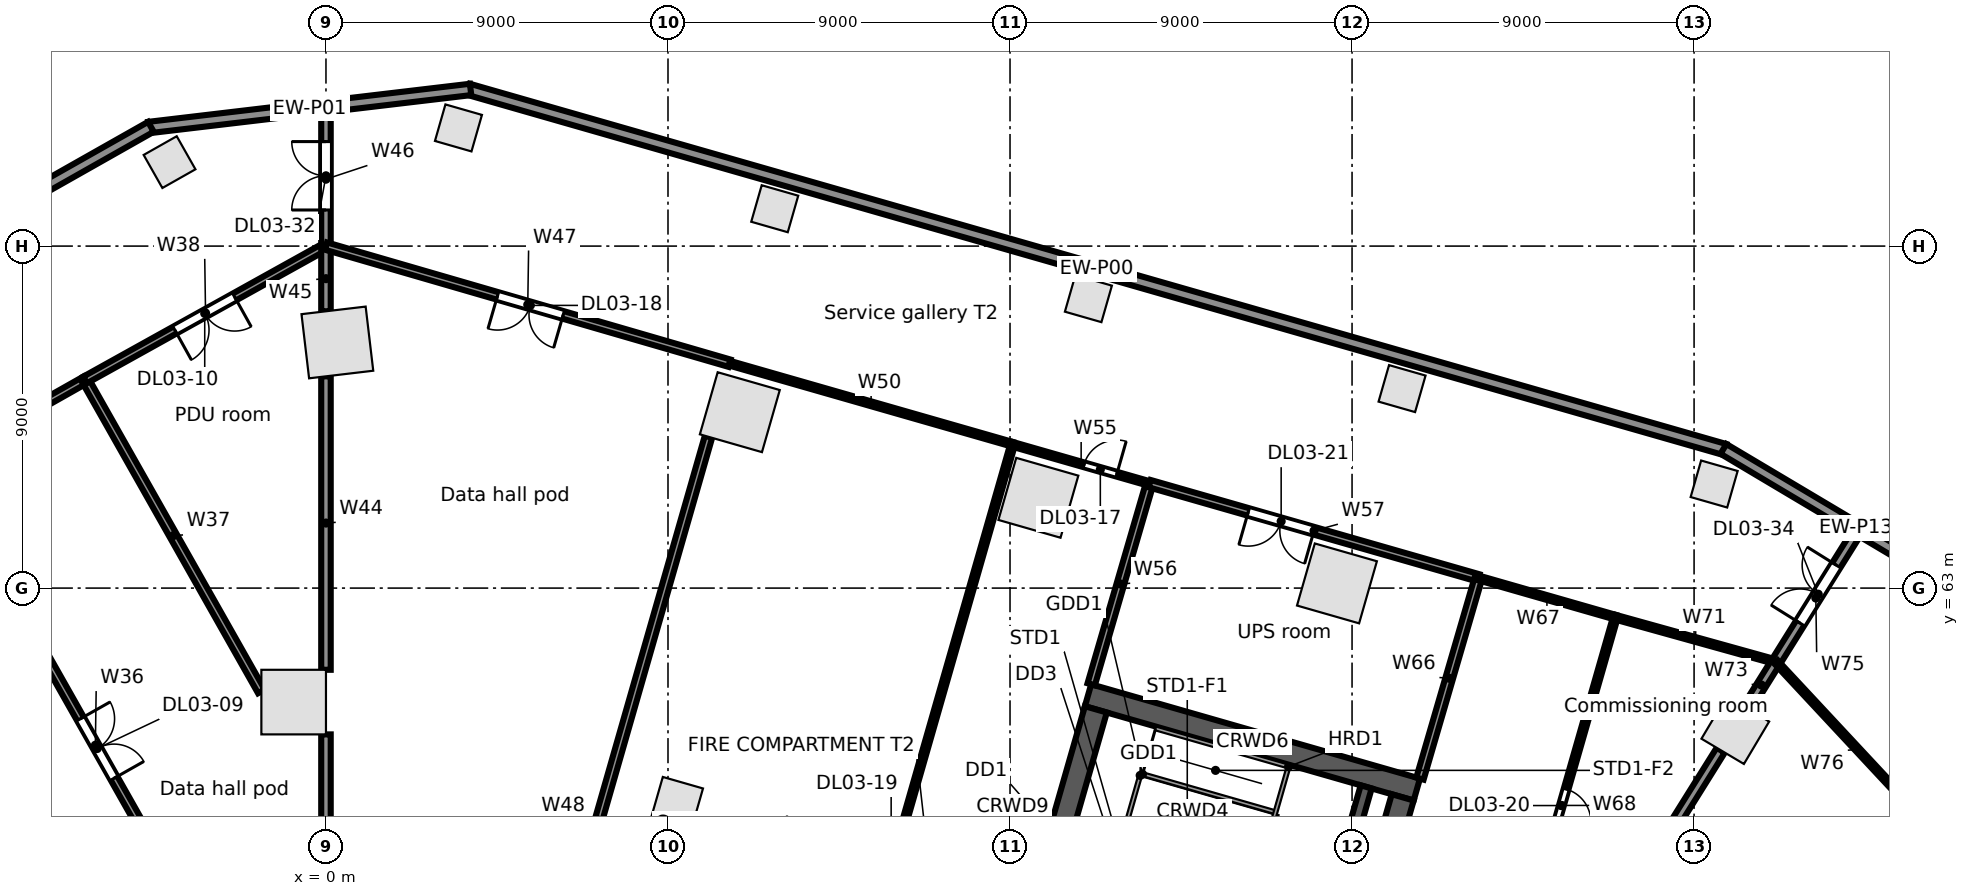
"""IFC4 building model, lengths in metres.
Left out: names, types, materials, properties, quantities, classifications, styles, units other than length and angle.
Written with IfcOpenShell. Run it as: python <this file> out.ifc"""

import sys

from ifc_helpers import new_model, si_unit, direction, frame, frame_2d, origin, origin_2d, place, context, subcontext, project, spatial, rectangle, extrude, element, fill, save


model = new_model("IFC4")
c1 = context("Model", 3, precision=1e-05, world=origin(), true_north=direction((0.0, 1.0)))
c2 = subcontext(c1, "Body", "Model", "MODEL_VIEW")
j1 = project(units=[si_unit("LENGTHUNIT", "METRE"), si_unit("PLANEANGLEUNIT", "RADIAN")], contexts=[c1])
p1 = place(None, origin())
s1 = spatial("IfcSite", under=j1, at=p1, CompositionType="ELEMENT")
p2 = place(p1, origin())
s2 = spatial("IfcBuilding", under=s1, at=p2, CompositionType="ELEMENT")
p3 = place(p2, frame((0.0, 0.0, 21.5)))
s3 = spatial("IfcBuildingStorey", under=s2, at=p3, CompositionType="ELEMENT", Elevation=21.5)
p4 = place(p3, frame((37.085, 59.262, 0.0), z_axis=(0.0, 0.0, 1.0), x_axis=(-0.859406411501, 0.511293086077, 0.0)))
e1 = element("IfcColumn", 1, at=p4, inside=s3, PredefinedType="COLUMN", context=c2, shape_type="SweptSolid", body=[
    extrude(rectangle(XDim=1.3, YDim=1.3, at=origin_2d()), origin(), (0.0, 0.0, 1.0), 5.0),
])
for number, where, z_axis, x_axis in (
    (2, (26.603, 63.124, 0.0), (0.0, 0.0, 1.0), (-0.961, 0.276, 0.0)),
    (3, (18.746, 65.376, 0.0), (0.0, 0.0, 1.0), (-0.961, 0.276, 0.0)),
    (4, (10.89, 67.629, 0.0), (0.0, 0.0, 1.0), (-0.961, 0.276, 0.0)),
    (5, (0.3, 69.464, 0.0), (0.0, 0.0, 1.0), (-0.993, -0.118, 0.0)),
    (6, (-0.85, 60.0, 0.0), (0.0, 0.0, 1.0), (0.0, 1.0, 0.0)),
):
    element("IfcColumn", number, at=place(p3, frame(where, z_axis=z_axis, x_axis=x_axis)), inside=s3, PredefinedType="COLUMN", context=c2, shape_type="SweptSolid", body=[
        extrude(rectangle(XDim=1.7, YDim=1.7, at=origin_2d()), origin(), (0.0, 0.0, 1.0), 5.0),
    ])
for number, where, z_axis, x_axis in (
    (7, (36.528, 65.739, 0.0), (0.0, 0.0, 1.0), (-0.961, 0.276, 0.0)),
    (8, (28.316, 68.25, 0.0), (0.0, 0.0, 1.0), (-0.961, 0.276, 0.0)),
    (9, (20.062, 70.616, 0.0), (0.0, 0.0, 1.0), (-0.961, 0.276, 0.0)),
    (10, (11.809, 72.983, 0.0), (0.0, 0.0, 1.0), (-0.961, 0.276, 0.0)),
    (11, (3.486, 75.11, 0.0), (0.0, 0.0, 1.0), (-0.961, 0.276, 0.0)),
    (12, (-4.116, 74.21, 0.0), (0.0, 0.0, 1.0), (-0.87, -0.492, 0.0)),
):
    element("IfcColumn", number, at=place(p3, frame(where, z_axis=z_axis, x_axis=x_axis)), inside=s3, PredefinedType="COLUMN", context=c2, shape_type="SweptSolid", body=[
        extrude(rectangle(XDim=1.0, YDim=1.0, at=origin_2d()), origin(), (0.0, 0.0, 1.0), 4.68),
    ])
p5 = place(p3, frame((9.241, 57.35, 0.0), z_axis=(0.0, 0.0, 1.0), x_axis=(0.961261695938, -0.275637355817, 0.0)))
e13 = element("IfcColumn", 13, at=p5, inside=s3, PredefinedType="COLUMN", context=c2, shape_type="SweptSolid", body=[
    extrude(rectangle(XDim=1.1, YDim=1.1, at=origin_2d()), origin(), (0.0, 0.0, 1.0), 5.0),
])
p6 = place(p3, frame((3.747, 76.127, 0.0), z_axis=(0.0, 0.0, 1.0), x_axis=(0.961261546185, -0.275637878067, 0.0)))
e14 = element("IfcWall", 14, at=p6, inside=s3, PredefinedType="STANDARD", context=c2, shape_type="SweptSolid", body=[
    extrude(rectangle(XDim=34.395, YDim=0.3, at=frame_2d((17.197, 0.0))), origin(), (0.0, 0.0, 1.0), 4.68),
])
p7 = place(p3, frame((-4.663, 75.12, 0.0), z_axis=(0.0, 0.0, 1.0), x_axis=(0.993070050845, 0.117523929966, 0.0)))
e15 = element("IfcWall", 15, at=p7, inside=s3, PredefinedType="STANDARD", context=c2, shape_type="SweptSolid", body=[
    extrude(rectangle(XDim=8.528, YDim=0.3, at=frame_2d((4.264, 0.0))), origin(), (0.0, 0.0, 1.0), 4.68),
])
p8 = place(p3, frame((-63.707, 41.701, 0.0), z_axis=(0.0, 0.0, 1.0), x_axis=(0.870355510268, 0.492423888277, 0.0)))
e16 = element("IfcWall", 16, at=p8, inside=s3, PredefinedType="STANDARD", context=c2, shape_type="SweptSolid", body=[
    extrude(rectangle(XDim=67.903, YDim=0.3, at=frame_2d((33.952, 0.0))), origin(), (0.0, 0.0, 1.0), 4.68),
])
p9 = place(p3, frame((36.773, 66.662, 0.0), z_axis=(0.0, 0.0, 1.0), x_axis=(0.859395976805, -0.511310624817, 0.0)))
e17 = element("IfcWall", 17, at=p9, inside=s3, PredefinedType="STANDARD", context=c2, shape_type="SweptSolid", body=[
    extrude(rectangle(XDim=8.102, YDim=0.3, at=frame_2d((4.051, 0.0))), origin(), (0.0, 0.0, 1.0), 4.68),
])
p10 = place(p3, frame((-11.681, 60.744, 0.0), z_axis=(0.0, 0.0, 1.0), x_axis=(0.492426772896, -0.870353878221, 0.0)))
e18 = element("IfcWall", 18, at=p10, inside=s3, PredefinedType="SOLIDWALL", context=c2, shape_type="SweptSolid", body=[
    extrude(rectangle(XDim=12.8, YDim=0.6, at=frame_2d((6.4, 0.0))), origin(), (0.0, 0.0, 1.0), 4.68),
])
p11 = place(p3, frame((20.053, 60.18, 0.0), z_axis=(0.0, 0.0, 1.0), x_axis=(0.96126248289, -0.275634611374, 0.0)))
e19 = element("IfcWall", 19, at=p11, inside=s3, PredefinedType="SOLIDWALL", context=c2, shape_type="SweptSolid", body=[
    extrude(rectangle(XDim=9.0, YDim=0.6, at=frame_2d((4.5, 0.0))), origin(), (0.0, 0.0, 1.0), 4.68),
])
p12 = place(p3, frame((17.282, 49.427, 0.0), z_axis=(0.0, 0.0, 1.0), x_axis=(0.275631631629, 0.961263337304, 0.0)))
e20 = element("IfcWall", 20, at=p12, inside=s3, PredefinedType="SOLIDWALL", context=c2, shape_type="SweptSolid", body=[
    extrude(rectangle(XDim=10.8, YDim=0.6, at=frame_2d((5.4, 0.0))), origin(), (0.0, 0.0, 1.0), 4.68),
])
p13 = place(p12, frame((4.8, 0.0, 0.0)))
e21 = element("IfcOpeningElement", 21, at=p13, cuts=e20, PredefinedType="OPENING", context=c2, shape_type="SweptSolid", body=[
    extrude(rectangle(XDim=1.2, YDim=2.1, at=frame_2d((0.6, 1.05))), frame((0.0, 0.31, 0.0), z_axis=(0.0, -1.0, 0.0), x_axis=(1.0, 0.0, 0.0)), (0.0, 0.0, 1.0), 0.62),
])
p14 = place(p3, frame((26.256, 53.876, 0.0), z_axis=(0.0, 0.0, 1.0), x_axis=(0.275612739511, 0.961268754209, 0.0)))
e22 = element("IfcWall", 22, at=p14, inside=s3, PredefinedType="SOLIDWALL", context=c2, shape_type="SweptSolid", body=[
    extrude(rectangle(XDim=4.05, YDim=0.3, at=frame_2d((2.025, 0.0))), origin(), (0.0, 0.0, 1.0), 4.68),
])
p15 = place(p3, frame((25.356, 47.112, 0.0), z_axis=(0.0, 0.0, 1.0), x_axis=(0.275631631629, 0.961263337304, 0.0)))
e23 = element("IfcWall", 23, at=p15, inside=s3, PredefinedType="SOLIDWALL", context=c2, shape_type="SweptSolid", body=[
    extrude(rectangle(XDim=10.8, YDim=0.6, at=frame_2d((5.4, 0.0))), origin(), (0.0, 0.0, 1.0), 4.68),
])
p16 = place(p15, frame((4.8, 0.0, 0.0)))
e24 = element("IfcOpeningElement", 24, at=p16, cuts=e23, PredefinedType="OPENING", context=c2, shape_type="SweptSolid", body=[
    extrude(rectangle(XDim=1.2, YDim=2.1, at=frame_2d((0.6, 1.05))), frame((0.0, 0.31, 0.0), z_axis=(0.0, -1.0, 0.0), x_axis=(1.0, 0.0, 0.0)), (0.0, 0.0, 1.0), 0.62),
])
p17 = place(p3, frame((-10.254, 66.263, 0.0), z_axis=(0.0, 0.0, 1.0), x_axis=(0.870454697906, 0.492248533664, 0.0)))
e25 = element("IfcWall", 25, at=p17, inside=s3, PredefinedType="PARTITIONING", context=c2, shape_type="SweptSolid", body=[
    extrude(rectangle(XDim=4.5, YDim=0.2, at=frame_2d((2.25, 0.0))), origin(), (0.0, 0.0, 1.0), 4.68),
])
p18 = place(p3, frame((-10.254, 66.263, 0.0), z_axis=(0.0, 0.0, 1.0), x_axis=(0.492411664329, -0.870362426138, 0.0)))
e26 = element("IfcWall", 26, at=p18, inside=s3, PredefinedType="PARTITIONING", context=c2, shape_type="SweptSolid", body=[
    extrude(rectangle(XDim=17.0, YDim=0.2, at=frame_2d((8.5, 0.0))), origin(), (0.0, 0.0, 1.0), 3.742),
])
p19 = place(p18, frame((7.7, 0.0, 0.0)))
e27 = element("IfcOpeningElement", 27, at=p19, cuts=e26, PredefinedType="OPENING", context=c2, shape_type="SweptSolid", body=[
    extrude(rectangle(XDim=1.8, YDim=2.1, at=frame_2d((0.9, 1.05))), frame((0.0, 0.11, 0.0), z_axis=(0.0, -1.0, 0.0), x_axis=(1.0, 0.0, 0.0)), (0.0, 0.0, 1.0), 0.22),
])
p20 = place(p3, frame((-6.337, 68.478, 0.0), z_axis=(0.0, 0.0, 1.0), x_axis=(0.492412602502, -0.870361895361, 0.0)))
e28 = element("IfcWall", 28, at=p20, inside=s3, PredefinedType="PARTITIONING", context=c2, shape_type="SweptSolid", body=[
    extrude(rectangle(XDim=9.417, YDim=0.2, at=frame_2d((4.708, 0.0))), origin(), (0.0, 0.0, 1.0), 3.742),
])
p21 = place(p3, frame((-6.337, 68.478, 0.0), z_axis=(0.0, 0.0, 1.0), x_axis=(0.87407148623, 0.485797320864, 0.0)))
e29 = element("IfcWall", 29, at=p21, inside=s3, PredefinedType="PARTITIONING", context=c2, shape_type="SweptSolid", body=[
    extrude(rectangle(XDim=7.25, YDim=0.2, at=frame_2d((3.625, 0.0))), origin(), (0.0, 0.0, 1.0), 3.96),
])
p22 = place(p21, frame((2.7, 0.0, 0.0)))
e30 = element("IfcOpeningElement", 30, at=p22, cuts=e29, PredefinedType="OPENING", context=c2, shape_type="SweptSolid", body=[
    extrude(rectangle(XDim=1.8, YDim=2.1, at=frame_2d((0.9, 1.05))), frame((0.0, 0.11, 0.0), z_axis=(0.0, -1.0, 0.0), x_axis=(1.0, 0.0, 0.0)), (0.0, 0.0, 1.0), 0.22),
])
p23 = place(p3, frame((0.0, 49.726, 0.0), z_axis=(0.0, 0.0, 1.0), x_axis=(0.0, 1.0, 0.0)))
e31 = element("IfcWall", 31, at=p23, inside=s3, PredefinedType="PARTITIONING", context=c2, shape_type="SweptSolid", body=[
    extrude(rectangle(XDim=9.424, YDim=0.25, at=frame_2d((4.712, 0.0))), origin(), (0.0, 0.0, 1.0), 4.68),
])
p24 = place(p3, frame((0.0, 60.85, 0.0), z_axis=(0.0, 0.0, 1.0), x_axis=(0.0, 1.0, 0.0)))
e32 = element("IfcWall", 32, at=p24, inside=s3, PredefinedType="PARTITIONING", context=c2, shape_type="SweptSolid", body=[
    extrude(rectangle(XDim=7.723, YDim=0.25, at=frame_2d((3.861, 0.0))), origin(), (0.0, 0.0, 1.0), 3.952),
])
p25 = place(p3, frame((0.0, 70.285, 0.0), z_axis=(0.0, 0.0, 1.0), x_axis=(0.0, 1.0, 0.0)))
e33 = element("IfcWall", 33, at=p25, inside=s3, PredefinedType="PARTITIONING", context=c2, shape_type="SweptSolid", body=[
    extrude(rectangle(XDim=1.715, YDim=0.25, at=frame_2d((0.857, 0.0))), origin(), (0.0, 0.0, 1.0), 4.68),
])
p26 = place(p3, frame((0.0, 72.0, 0.0), z_axis=(0.0, 0.0, 1.0), x_axis=(0.0, 1.0, 0.0)))
e34 = element("IfcWall", 34, at=p26, inside=s3, PredefinedType="PARTITIONING", context=c2, shape_type="SweptSolid", body=[
    extrude(rectangle(XDim=3.521, YDim=0.25, at=frame_2d((1.76, 0.0))), origin(), (0.0, 0.0, 1.0), 3.96),
])
p27 = place(p26, frame((0.95, 0.0, 0.0)))
e35 = element("IfcOpeningElement", 35, at=p27, cuts=e34, PredefinedType="OPENING", context=c2, shape_type="SweptSolid", body=[
    extrude(rectangle(XDim=1.8, YDim=2.1, at=frame_2d((0.9, 1.05))), frame((0.0, 0.135, 0.0), z_axis=(0.0, -1.0, 0.0), x_axis=(1.0, 0.0, 0.0)), (0.0, 0.0, 1.0), 0.27),
])
p28 = place(p3, frame((0.0, 72.0, 0.0), z_axis=(0.0, 0.0, 1.0), x_axis=(0.960375968852, -0.278707729443, 0.0)))
e36 = element("IfcWall", 36, at=p28, inside=s3, PredefinedType="PARTITIONING", context=c2, shape_type="SweptSolid", body=[
    extrude(rectangle(XDim=11.058, YDim=0.2, at=frame_2d((5.529, 0.0))), origin(), (0.0, 0.0, 1.0), 3.742),
])
p29 = place(p28, frame((4.7, 0.0, 0.0)))
e37 = element("IfcOpeningElement", 37, at=p29, cuts=e36, PredefinedType="OPENING", context=c2, shape_type="SweptSolid", body=[
    extrude(rectangle(XDim=1.8, YDim=2.1, at=frame_2d((0.9, 1.05))), frame((0.0, 0.11, 0.0), z_axis=(0.0, -1.0, 0.0), x_axis=(1.0, 0.0, 0.0)), (0.0, 0.0, 1.0), 0.22),
])
p30 = place(p3, frame((4.28, 46.809, 0.0), z_axis=(0.0, 0.0, 1.0), x_axis=(0.27566906052, 0.961252604195, 0.0)))
e38 = element("IfcWall", 38, at=p30, inside=s3, PredefinedType="PARTITIONING", context=c2, shape_type="SweptSolid", body=[
    extrude(rectangle(XDim=20.985, YDim=0.2, at=frame_2d((10.493, 0.0))), origin(), (0.0, 0.0, 1.0), 3.742),
])
p31 = place(p3, frame((10.62, 68.918, 0.0), z_axis=(0.0, 0.0, 1.0), x_axis=(0.961260764876, -0.275640602796, 0.0)))
e39 = element("IfcWall", 39, at=p31, inside=s3, PredefinedType="PARTITIONING", context=c2, shape_type="SweptSolid", body=[
    extrude(rectangle(XDim=7.749, YDim=0.125, at=frame_2d((3.875, 0.0))), origin(), (0.0, 0.0, 1.0), 3.742),
])
p32 = place(p3, frame((11.73, 44.673, 0.0), z_axis=(0.0, 0.0, 1.0), x_axis=(0.275616869382, 0.961267570093, 0.0)))
e40 = element("IfcWall", 40, at=p32, inside=s3, PredefinedType="PARTITIONING", context=c2, shape_type="SweptSolid", body=[
    extrude(rectangle(XDim=23.0, YDim=0.125, at=frame_2d((11.5, 0.0))), origin(), (0.0, 0.0, 1.0), 3.742),
])
p33 = place(p32, frame((10.95, 0.0, 0.0)))
e41 = element("IfcOpeningElement", 41, at=p33, cuts=e40, PredefinedType="OPENING", context=c2, shape_type="SweptSolid", body=[
    extrude(rectangle(XDim=0.9, YDim=2.1, at=frame_2d((0.45, 1.05))), frame((0.0, 0.073, 0.0), z_axis=(0.0, -1.0, 0.0), x_axis=(1.0, 0.0, 0.0)), (0.0, 0.0, 1.0), 0.145),
])
p34 = place(p3, frame((18.069, 66.782, 0.0), z_axis=(0.0, 0.0, 1.0), x_axis=(0.961314848061, -0.275451924837, 0.0)))
e42 = element("IfcWall", 42, at=p34, inside=s3, PredefinedType="PARTITIONING", context=c2, shape_type="SweptSolid", body=[
    extrude(rectangle(XDim=3.75, YDim=0.125, at=frame_2d((1.875, 0.0))), origin(), (0.0, 0.0, 1.0), 3.742),
])
p35 = place(p34, frame((1.95, 0.0, 0.0)))
e43 = element("IfcOpeningElement", 43, at=p35, cuts=e42, PredefinedType="OPENING", context=c2, shape_type="SweptSolid", body=[
    extrude(rectangle(XDim=0.9, YDim=2.1, at=frame_2d((0.45, 1.05))), frame((0.0, 0.073, 0.0), z_axis=(0.0, -1.0, 0.0), x_axis=(1.0, 0.0, 0.0)), (0.0, 0.0, 1.0), 0.145),
])
p36 = place(p3, frame((20.136, 60.468, 0.0), z_axis=(0.0, 0.0, 1.0), x_axis=(0.279630121779, 0.96010780384, 0.0)))
e44 = element("IfcWall", 44, at=p36, inside=s3, PredefinedType="PARTITIONING", context=c2, shape_type="SweptSolid", body=[
    extrude(rectangle(XDim=5.5, YDim=0.2, at=frame_2d((2.75, 0.0))), origin(), (0.0, 0.0, 1.0), 3.96),
])
p37 = place(p3, frame((21.674, 65.749, 0.0), z_axis=(0.0, 0.0, 1.0), x_axis=(0.961259417468, -0.275645301662, 0.0)))
e45 = element("IfcWall", 45, at=p37, inside=s3, PredefinedType="PARTITIONING", context=c2, shape_type="SweptSolid", body=[
    extrude(rectangle(XDim=9.0, YDim=0.2, at=frame_2d((4.5, 0.0))), origin(), (0.0, 0.0, 1.0), 3.748),
])
p38 = place(p37, frame((2.7, 0.0, 0.0)))
e46 = element("IfcOpeningElement", 46, at=p38, cuts=e45, PredefinedType="OPENING", context=c2, shape_type="SweptSolid", body=[
    extrude(rectangle(XDim=1.8, YDim=2.1, at=frame_2d((0.9, 1.05))), frame((0.0, 0.11, 0.0), z_axis=(0.0, -1.0, 0.0), x_axis=(1.0, 0.0, 0.0)), (0.0, 0.0, 1.0), 0.22),
])
p39 = place(p3, frame((28.787, 57.987, 0.0), z_axis=(0.0, 0.0, 1.0), x_axis=(0.279752860161, 0.960072047938, 0.0)))
e47 = element("IfcWall", 47, at=p39, inside=s3, PredefinedType="PARTITIONING", context=c2, shape_type="SweptSolid", body=[
    extrude(rectangle(XDim=5.501, YDim=0.2, at=frame_2d((2.75, 0.0))), origin(), (0.0, 0.0, 1.0), 3.852),
])
p40 = place(p3, frame((30.326, 63.268, 0.0), z_axis=(0.0, 0.0, 1.0), x_axis=(0.96120880595, -0.275821738383, 0.0)))
e48 = element("IfcWall", 48, at=p40, inside=s3, PredefinedType="PARTITIONING", context=c2, shape_type="SweptSolid", body=[
    extrude(rectangle(XDim=3.75, YDim=0.125, at=frame_2d((1.875, 0.0))), origin(), (0.0, 0.0, 1.0), 4.68),
])
p41 = place(p3, frame((31.089, 52.327, 0.0), z_axis=(0.0, 0.0, 1.0), x_axis=(0.275640835953, 0.961260698019, 0.0)))
e49 = element("IfcWall", 49, at=p41, inside=s3, PredefinedType="PARTITIONING", context=c2, shape_type="SweptSolid", body=[
    extrude(rectangle(XDim=10.306, YDim=0.125, at=frame_2d((5.153, 0.0))), origin(), (0.0, 0.0, 1.0), 3.852),
])
p42 = place(p41, frame((4.7, 0.0, 0.0)))
e50 = element("IfcOpeningElement", 50, at=p42, cuts=e49, PredefinedType="OPENING", context=c2, shape_type="SweptSolid", body=[
    extrude(rectangle(XDim=0.9, YDim=2.1, at=frame_2d((0.45, 1.05))), frame((0.0, 0.073, 0.0), z_axis=(0.0, -1.0, 0.0), x_axis=(1.0, 0.0, 0.0)), (0.0, 0.0, 1.0), 0.145),
])
p43 = place(p3, frame((31.795, 50.883, 0.0), z_axis=(0.0, 0.0, 1.0), x_axis=(0.529939676421, 0.848035340864, 0.0)))
e51 = element("IfcWall", 51, at=p43, inside=s3, PredefinedType="PARTITIONING", context=c2, shape_type="SweptSolid", body=[
    extrude(rectangle(XDim=9.258, YDim=0.25, at=frame_2d((4.629, 0.0))), origin(), (0.0, 0.0, 1.0), 3.742),
])
p44 = place(p3, frame((33.93, 62.234, 0.0), z_axis=(0.0, 0.0, 1.0), x_axis=(0.963433299433, -0.267948274007, 0.0)))
e52 = element("IfcWall", 52, at=p44, inside=s3, PredefinedType="PARTITIONING", context=c2, shape_type="SweptSolid", body=[
    extrude(rectangle(XDim=4.385, YDim=0.125, at=frame_2d((2.192, 0.0))), origin(), (0.0, 0.0, 1.0), 3.96),
])
p45 = place(p3, frame((37.39, 59.837, 0.0), z_axis=(0.0, 0.0, 1.0), x_axis=(0.530151180786, 0.84790313451, 0.0)))
e53 = element("IfcWall", 53, at=p45, inside=s3, PredefinedType="PARTITIONING", context=c2, shape_type="SweptSolid", body=[
    extrude(rectangle(XDim=1.441, YDim=0.25, at=frame_2d((0.721, 0.0))), origin(), (0.0, 0.0, 1.0), 4.68),
])
p46 = place(p3, frame((38.154, 61.059, 0.0), z_axis=(0.0, 0.0, 1.0), x_axis=(0.529921368013, 0.848046781565, 0.0)))
e54 = element("IfcWall", 54, at=p46, inside=s3, PredefinedType="PARTITIONING", context=c2, shape_type="SweptSolid", body=[
    extrude(rectangle(XDim=3.961, YDim=0.25, at=frame_2d((1.98, 0.0))), origin(), (0.0, 0.0, 1.0), 3.96),
])
p47 = place(p46, frame((1.2, 0.0, 0.0)))
e55 = element("IfcOpeningElement", 55, at=p47, cuts=e54, PredefinedType="OPENING", context=c2, shape_type="SweptSolid", body=[
    extrude(rectangle(XDim=1.8, YDim=2.1, at=frame_2d((0.9, 1.05))), frame((0.0, 0.135, 0.0), z_axis=(0.0, -1.0, 0.0), x_axis=(1.0, 0.0, 0.0)), (0.0, 0.0, 1.0), 0.27),
])
p48 = place(p3, frame((38.154, 61.059, 0.0), z_axis=(0.0, 0.0, 1.0), x_axis=(0.681663875787, -0.731665470312, 0.0)))
e56 = element("IfcWall", 56, at=p48, inside=s3, PredefinedType="PARTITIONING", context=c2, shape_type="SweptSolid", body=[
    extrude(rectangle(XDim=6.303, YDim=0.125, at=frame_2d((3.152, 0.0))), origin(), (0.0, 0.0, 1.0), 3.96),
])
p49 = place(p19, origin())
e57 = element("IfcDoor", 57, at=p49, inside=s3, OperationType="DOUBLE_DOOR_SINGLE_SWING", PredefinedType="DOOR", context=c2, shape_type="SweptSolid", body=[
    extrude(rectangle(XDim=1.8, YDim=2.1, at=frame_2d((0.9, 1.05))), frame((0.0, 0.025, 0.0), z_axis=(0.0, -1.0, 0.0), x_axis=(1.0, 0.0, 0.0)), (0.0, 0.0, 1.0), 0.05),
])
fill(e27, e57)
p50 = place(p22, frame((1.8, 0.0, 0.0), z_axis=(0.0, 0.0, 1.0), x_axis=(-1.0, 0.0, 0.0)))
e58 = element("IfcDoor", 58, at=p50, inside=s3, OperationType="DOUBLE_DOOR_SINGLE_SWING", PredefinedType="DOOR", context=c2, shape_type="SweptSolid", body=[
    extrude(rectangle(XDim=1.8, YDim=2.1, at=frame_2d((0.9, 1.05))), frame((0.0, 0.025, 0.0), z_axis=(0.0, -1.0, 0.0), x_axis=(1.0, 0.0, 0.0)), (0.0, 0.0, 1.0), 0.05),
])
fill(e30, e58)
p51 = place(p35, origin())
e59 = element("IfcDoor", 59, at=p51, inside=s3, OperationType="SINGLE_SWING_RIGHT", PredefinedType="DOOR", context=c2, shape_type="SweptSolid", body=[
    extrude(rectangle(XDim=0.9, YDim=2.1, at=frame_2d((0.45, 1.05))), frame((0.0, 0.025, 0.0), z_axis=(0.0, -1.0, 0.0), x_axis=(1.0, 0.0, 0.0)), (0.0, 0.0, 1.0), 0.05),
])
fill(e43, e59)
p52 = place(p29, frame((1.8, 0.0, 0.0), z_axis=(0.0, 0.0, 1.0), x_axis=(-1.0, 0.0, 0.0)))
e60 = element("IfcDoor", 60, at=p52, inside=s3, OperationType="DOUBLE_DOOR_SINGLE_SWING", PredefinedType="DOOR", context=c2, shape_type="SweptSolid", body=[
    extrude(rectangle(XDim=1.8, YDim=2.1, at=frame_2d((0.9, 1.05))), frame((0.0, 0.025, 0.0), z_axis=(0.0, -1.0, 0.0), x_axis=(1.0, 0.0, 0.0)), (0.0, 0.0, 1.0), 0.05),
])
fill(e37, e60)
p53 = place(p42, frame((0.9, 0.0, 0.0), z_axis=(0.0, 0.0, 1.0), x_axis=(-1.0, 0.0, 0.0)))
e61 = element("IfcDoor", 61, at=p53, inside=s3, OperationType="SINGLE_SWING_RIGHT", PredefinedType="DOOR", context=c2, shape_type="SweptSolid", body=[
    extrude(rectangle(XDim=0.9, YDim=2.1, at=frame_2d((0.45, 1.05))), frame((0.0, 0.025, 0.0), z_axis=(0.0, -1.0, 0.0), x_axis=(1.0, 0.0, 0.0)), (0.0, 0.0, 1.0), 0.05),
])
fill(e50, e61)
p54 = place(p38, frame((1.8, 0.0, 0.0), z_axis=(0.0, 0.0, 1.0), x_axis=(-1.0, 0.0, 0.0)))
e62 = element("IfcDoor", 62, at=p54, inside=s3, OperationType="DOUBLE_DOOR_SINGLE_SWING", PredefinedType="DOOR", context=c2, shape_type="SweptSolid", body=[
    extrude(rectangle(XDim=1.8, YDim=2.1, at=frame_2d((0.9, 1.05))), frame((0.0, 0.025, 0.0), z_axis=(0.0, -1.0, 0.0), x_axis=(1.0, 0.0, 0.0)), (0.0, 0.0, 1.0), 0.05),
])
fill(e46, e62)
p55 = place(p27, origin())
e63 = element("IfcDoor", 63, at=p55, inside=s3, OperationType="DOUBLE_DOOR_SINGLE_SWING", PredefinedType="DOOR", context=c2, shape_type="SweptSolid", body=[
    extrude(rectangle(XDim=1.8, YDim=2.1, at=frame_2d((0.9, 1.05))), frame((0.0, 0.025, 0.0), z_axis=(0.0, -1.0, 0.0), x_axis=(1.0, 0.0, 0.0)), (0.0, 0.0, 1.0), 0.05),
])
fill(e35, e63)
p56 = place(p47, origin())
e64 = element("IfcDoor", 64, at=p56, inside=s3, OperationType="DOUBLE_DOOR_SINGLE_SWING", PredefinedType="DOOR", context=c2, shape_type="SweptSolid", body=[
    extrude(rectangle(XDim=1.8, YDim=2.1, at=frame_2d((0.9, 1.05))), frame((0.0, 0.025, 0.0), z_axis=(0.0, -1.0, 0.0), x_axis=(1.0, 0.0, 0.0)), (0.0, 0.0, 1.0), 0.05),
])
fill(e55, e64)
save(model, sys.argv[1])
